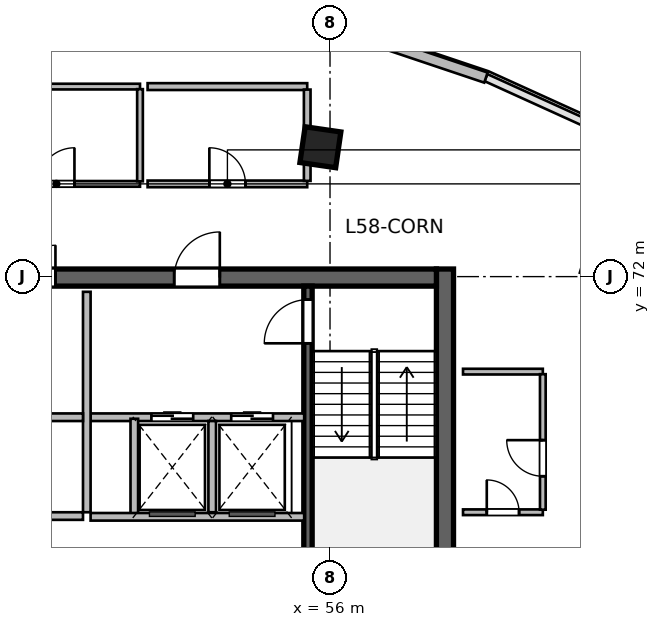
"""IFC4 building model, lengths in metres.
Left out: names, types, materials, properties, quantities, classifications, styles, units other than length and angle.
Written with IfcOpenShell. Run it as: python <this file> out.ifc"""

import sys

from ifc_helpers import new_model, si_unit, direction, frame, frame_2d, origin, origin_2d, place, context, subcontext, project, spatial, rectangle, extrude, source, transform, mapped, element, fill, save


model = new_model("IFC4")
c1 = context("Model", 3, precision=1e-05, world=origin(), true_north=direction((0.0, 1.0)))
c2 = subcontext(c1, "Body", "Model", "MODEL_VIEW")
j1 = project(units=[si_unit("LENGTHUNIT", "METRE"), si_unit("PLANEANGLEUNIT", "RADIAN")], contexts=[c1])
p1 = place(None, origin())
s1 = spatial("IfcSite", under=j1, at=p1, CompositionType="ELEMENT")
p2 = place(p1, origin())
s2 = spatial("IfcBuilding", under=s1, at=p2, CompositionType="ELEMENT")
p3 = place(p2, frame((0.0, 0.0, 239.1)))
s3 = spatial("IfcBuildingStorey", under=s2, at=p3, CompositionType="ELEMENT", Elevation=239.1)
m1 = source(origin(), c2, "Body", "SweptSolid", [
    extrude(rectangle(XDim=12.0, YDim=0.45, at=frame_2d((6.0, 0.0))), origin(), (0.0, 0.0, 1.0), 3.9),
])
p4 = place(p3, frame((59.025, 60.2, 0.0), z_axis=(0.0, 0.0, 1.0), x_axis=(0.0, 1.0, 0.0)))
e1 = element("IfcWall", 1, at=p4, inside=s3, PredefinedType="SHEAR", context=c2, shape_type="MappedRepresentation", body=[
    mapped(m1, transform((0.0, 0.0, 0.0), scale=1.0)),
])
m2 = source(origin(), c2, "Body", "SweptSolid", [
    extrude(rectangle(XDim=21.6, YDim=0.45, at=frame_2d((10.8, 0.0))), origin(), (0.0, 0.0, 1.0), 3.9),
])
p5 = place(p3, frame((37.2, 71.975, 0.0), z_axis=(0.0, 0.0, 1.0), x_axis=(1.0, 0.0, 0.0)))
e2 = element("IfcWall", 2, at=p5, inside=s3, PredefinedType="SHEAR", context=c2, shape_type="MappedRepresentation", body=[
    mapped(m2, transform((0.0, 0.0, 0.0), scale=1.0)),
])
p6 = place(p5, frame((1.2, 0.0, 0.0)))
e3 = element("IfcOpeningElement", 3, at=p6, cuts=e2, PredefinedType="OPENING", context=c2, shape_type="SweptSolid", body=[
    extrude(rectangle(XDim=0.9, YDim=2.1, at=frame_2d((0.45, 1.05))), frame((0.0, 0.235, 0.0), z_axis=(0.0, -1.0, 0.0), x_axis=(1.0, 0.0, 0.0)), (0.0, 0.0, 1.0), 0.47),
])
p7 = place(p5, frame((14.7, 0.0, 0.0)))
e4 = element("IfcOpeningElement", 4, at=p7, cuts=e2, PredefinedType="OPENING", context=c2, shape_type="SweptSolid", body=[
    extrude(rectangle(XDim=1.2, YDim=2.15, at=frame_2d((0.6, 1.075))), frame((0.0, 0.235, 0.0), z_axis=(0.0, -1.0, 0.0), x_axis=(1.0, 0.0, 0.0)), (0.0, 0.0, 1.0), 0.47),
])
p8 = place(p5, frame((4.15, 0.0, 0.0)))
e5 = element("IfcOpeningElement", 5, at=p8, cuts=e2, PredefinedType="OPENING", context=c2, shape_type="SweptSolid", body=[
    extrude(rectangle(XDim=1.3, YDim=2.15, at=frame_2d((0.65, 1.075))), frame((0.0, 0.235, 0.0), z_axis=(0.0, -1.0, 0.0), x_axis=(1.0, 0.0, 0.0)), (0.0, 0.0, 1.0), 0.47),
])
p9 = place(p5, frame((6.76, 0.0, 0.0)))
e6 = element("IfcOpeningElement", 6, at=p9, cuts=e2, PredefinedType="OPENING", context=c2, shape_type="SweptSolid", body=[
    extrude(rectangle(XDim=0.85, YDim=2.1, at=frame_2d((0.425, 1.05))), frame((0.0, 0.235, 0.0), z_axis=(0.0, -1.0, 0.0), x_axis=(1.0, 0.0, 0.0)), (0.0, 0.0, 1.0), 0.47),
])
p10 = place(p5, frame((8.76, 0.0, 0.0)))
e7 = element("IfcOpeningElement", 7, at=p10, cuts=e2, PredefinedType="OPENING", context=c2, shape_type="SweptSolid", body=[
    extrude(rectangle(XDim=0.85, YDim=2.1, at=frame_2d((0.425, 1.05))), frame((0.0, 0.235, 0.0), z_axis=(0.0, -1.0, 0.0), x_axis=(1.0, 0.0, 0.0)), (0.0, 0.0, 1.0), 0.47),
])
p11 = place(p5, frame((10.725, 0.0, 0.0)))
e8 = element("IfcOpeningElement", 8, at=p11, cuts=e2, PredefinedType="OPENING", context=c2, shape_type="SweptSolid", body=[
    extrude(rectangle(XDim=0.85, YDim=2.1, at=frame_2d((0.425, 1.05))), frame((0.0, 0.235, 0.0), z_axis=(0.0, -1.0, 0.0), x_axis=(1.0, 0.0, 0.0)), (0.0, 0.0, 1.0), 0.47),
])
m3 = source(origin(), c2, "Body", "SweptSolid", [
    extrude(rectangle(XDim=11.1, YDim=0.22, at=frame_2d((5.55, 0.0))), origin(), (0.0, 0.0, 1.0), 3.9),
])
p12 = place(p3, frame((55.42, 60.65, 0.0), z_axis=(0.0, 0.0, 1.0), x_axis=(0.0, 1.0, 0.0)))
e9 = element("IfcWall", 9, at=p12, inside=s3, PredefinedType="SHEAR", context=c2, shape_type="MappedRepresentation", body=[
    mapped(m3, transform((0.0, 0.0, 0.0), scale=1.0)),
])
p13 = place(p12, frame((9.595, 0.0, 0.0)))
e10 = element("IfcOpeningElement", 10, at=p13, cuts=e9, PredefinedType="OPENING", context=c2, shape_type="SweptSolid", body=[
    extrude(rectangle(XDim=1.15, YDim=2.15, at=frame_2d((0.575, 1.075))), frame((0.0, 0.12, 0.0), z_axis=(0.0, -1.0, 0.0), x_axis=(1.0, 0.0, 0.0)), (0.0, 0.0, 1.0), 0.24),
])
m4 = source(origin(), c2, "Body", "SweptSolid", [
    extrude(rectangle(XDim=0.95, YDim=0.95, at=origin_2d()), origin(), (0.0, 0.0, 1.0), 3.9),
])
p14 = place(p3, frame((55.747, 75.404, 0.0), z_axis=(0.0, 0.0, 1.0), x_axis=(0.143492621991, 0.98965138682, 0.0)))
e11 = element("IfcColumn", 11, at=p14, inside=s3, PredefinedType="COLUMN", context=c2, shape_type="MappedRepresentation", body=[
    mapped(m4, transform((0.0, 0.0, 0.0), scale=1.0)),
])
m5 = source(origin(), c2, "Body", "SweptSolid", [
    extrude(rectangle(XDim=3.559, YDim=0.28, at=frame_2d((1.78, 0.0))), origin(), (0.0, 0.0, 1.0), 3.65),
])
p15 = place(p3, frame((56.729, 78.37, 0.0), z_axis=(0.0, 0.0, 1.0), x_axis=(0.947933000453, -0.31846982063, 0.0)))
e12 = element("IfcWall", 12, at=p15, inside=s3, PredefinedType="SOLIDWALL", context=c2, shape_type="MappedRepresentation", body=[
    mapped(m5, transform((0.0, 0.0, 0.0), scale=1.0)),
])
m6 = source(origin(), c2, "Body", "SweptSolid", [
    extrude(rectangle(XDim=5.62, YDim=0.2, at=frame_2d((2.81, 0.0))), origin(), (0.0, 0.0, 1.0), 3.65),
])
p16 = place(p3, frame((49.7, 68.3, 0.0), z_axis=(0.0, 0.0, 1.0), x_axis=(1.0, 0.0, 0.0)))
e13 = element("IfcWall", 13, at=p16, inside=s3, PredefinedType="SOLIDWALL", context=c2, shape_type="MappedRepresentation", body=[
    mapped(m6, transform((0.0, 0.0, 0.0), scale=1.0)),
])
p17 = place(p16, frame((1.6, 0.0, 0.0)))
e14 = element("IfcOpeningElement", 14, at=p17, cuts=e13, PredefinedType="OPENING", context=c2, shape_type="SweptSolid", body=[
    extrude(rectangle(XDim=1.1, YDim=2.15, at=frame_2d((0.55, 1.075))), frame((0.0, 0.11, 0.0), z_axis=(0.0, -1.0, 0.0), x_axis=(1.0, 0.0, 0.0)), (0.0, 0.0, 1.0), 0.22),
])
p18 = place(p16, frame((3.7, 0.0, 0.0)))
e15 = element("IfcOpeningElement", 15, at=p18, cuts=e13, PredefinedType="OPENING", context=c2, shape_type="SweptSolid", body=[
    extrude(rectangle(XDim=1.1, YDim=2.15, at=frame_2d((0.55, 1.075))), frame((0.0, 0.11, 0.0), z_axis=(0.0, -1.0, 0.0), x_axis=(1.0, 0.0, 0.0)), (0.0, 0.0, 1.0), 0.22),
])
m7 = source(origin(), c2, "Body", "SweptSolid", [
    extrude(rectangle(XDim=5.8, YDim=0.2, at=frame_2d((2.9, 0.0))), origin(), (0.0, 0.0, 1.0), 3.65),
])
p19 = place(p3, frame((49.6, 65.8, 0.0), z_axis=(0.0, 0.0, 1.0), x_axis=(0.0, 1.0, 0.0)))
e16 = element("IfcWall", 16, at=p19, inside=s3, PredefinedType="SOLIDWALL", context=c2, shape_type="MappedRepresentation", body=[
    mapped(m7, transform((0.0, 0.0, 0.0), scale=1.0)),
])
m8 = source(origin(), c2, "Body", "SweptSolid", [
    extrude(rectangle(XDim=2.58, YDim=0.2, at=frame_2d((1.29, 0.0))), origin(), (0.0, 0.0, 1.0), 3.65),
])
p20 = place(p3, frame((50.85, 65.68, 0.0), z_axis=(0.0, 0.0, 1.0), x_axis=(0.0, 1.0, 0.0)))
e17 = element("IfcWall", 17, at=p20, inside=s3, PredefinedType="SOLIDWALL", context=c2, shape_type="MappedRepresentation", body=[
    mapped(m8, transform((0.0, 0.0, 0.0), scale=1.0)),
])
m9 = source(origin(), c2, "Body", "SweptSolid", [
    extrude(rectangle(XDim=2.4, YDim=0.2, at=frame_2d((1.2, 0.0))), origin(), (0.0, 0.0, 1.0), 3.65),
])
p21 = place(p3, frame((52.9, 65.8, 0.0), z_axis=(0.0, 0.0, 1.0), x_axis=(0.0, 1.0, 0.0)))
e18 = element("IfcWall", 18, at=p21, inside=s3, PredefinedType="SOLIDWALL", context=c2, shape_type="MappedRepresentation", body=[
    mapped(m9, transform((0.0, 0.0, 0.0), scale=1.0)),
])
p22 = place(p3, frame((49.7, 65.68, 0.0), z_axis=(0.0, 0.0, 1.0), x_axis=(1.0, 0.0, 0.0)))
e19 = element("IfcWall", 19, at=p22, inside=s3, PredefinedType="SOLIDWALL", context=c2, shape_type="MappedRepresentation", body=[
    mapped(m6, transform((0.0, 0.0, 0.0), scale=1.0)),
])
m10 = source(origin(), c2, "Body", "SweptSolid", [
    extrude(rectangle(XDim=8.8, YDim=0.2, at=frame_2d((4.4, 0.0))), origin(), (0.0, 0.0, 1.0), 3.65),
])
p23 = place(p3, frame((40.7, 68.3, 0.0), z_axis=(0.0, 0.0, 1.0), x_axis=(1.0, 0.0, 0.0)))
e20 = element("IfcWall", 20, at=p23, inside=s3, PredefinedType="SOLIDWALL", context=c2, shape_type="MappedRepresentation", body=[
    mapped(m10, transform((0.0, 0.0, 0.0), scale=1.0)),
])
p24 = place(p3, frame((40.7, 65.7, 0.0), z_axis=(0.0, 0.0, 1.0), x_axis=(1.0, 0.0, 0.0)))
e21 = element("IfcWall", 21, at=p24, inside=s3, PredefinedType="SOLIDWALL", context=c2, shape_type="MappedRepresentation", body=[
    mapped(m10, transform((0.0, 0.0, 0.0), scale=1.0)),
])
p25 = place(p24, frame((3.8, 0.0, 0.0)))
e22 = element("IfcOpeningElement", 22, at=p25, cuts=e21, PredefinedType="OPENING", context=c2, shape_type="SweptSolid", body=[
    extrude(rectangle(XDim=0.95, YDim=2.15, at=frame_2d((0.475, 1.075))), frame((0.0, 0.11, 0.0), z_axis=(0.0, -1.0, 0.0), x_axis=(1.0, 0.0, 0.0)), (0.0, 0.0, 1.0), 0.22),
])
m11 = source(origin(), c2, "Body", "SweptSolid", [
    extrude(rectangle(XDim=2.1, YDim=0.15, at=frame_2d((1.05, 0.0))), origin(), (0.0, 0.0, 1.0), 3.65),
])
p26 = place(p3, frame((59.5, 65.8, 0.0), z_axis=(0.0, 0.0, 1.0), x_axis=(1.0, 0.0, 0.0)))
e23 = element("IfcWall", 23, at=p26, inside=s3, PredefinedType="PARTITIONING", context=c2, shape_type="MappedRepresentation", body=[
    mapped(m11, transform((0.0, 0.0, 0.0), scale=1.0)),
])
p27 = place(p26, frame((0.625, 0.0, 0.0)))
e24 = element("IfcOpeningElement", 24, at=p27, cuts=e23, PredefinedType="OPENING", context=c2, shape_type="SweptSolid", body=[
    extrude(rectangle(XDim=0.85, YDim=2.1, at=frame_2d((0.425, 1.05))), frame((0.0, 0.085, 0.0), z_axis=(0.0, -1.0, 0.0), x_axis=(1.0, 0.0, 0.0)), (0.0, 0.0, 1.0), 0.17),
])
p28 = place(p3, frame((59.5, 69.5, 0.0), z_axis=(0.0, 0.0, 1.0), x_axis=(1.0, 0.0, 0.0)))
e25 = element("IfcWall", 25, at=p28, inside=s3, PredefinedType="PARTITIONING", context=c2, shape_type="MappedRepresentation", body=[
    mapped(m11, transform((0.0, 0.0, 0.0), scale=1.0)),
])
m12 = source(origin(), c2, "Body", "SweptSolid", [
    extrude(rectangle(XDim=3.565, YDim=0.15, at=frame_2d((1.783, 0.0))), origin(), (0.0, 0.0, 1.0), 3.65),
])
p29 = place(p3, frame((61.6, 65.867, 0.0), z_axis=(0.0, 0.0, 1.0), x_axis=(0.0, 1.0, 0.0)))
e26 = element("IfcWall", 26, at=p29, inside=s3, PredefinedType="PARTITIONING", context=c2, shape_type="MappedRepresentation", body=[
    mapped(m12, transform((0.0, 0.0, 0.0), scale=1.0)),
])
p30 = place(p29, frame((0.88, 0.0, 0.0)))
e27 = element("IfcOpeningElement", 27, at=p30, cuts=e26, PredefinedType="OPENING", context=c2, shape_type="SweptSolid", body=[
    extrude(rectangle(XDim=0.95, YDim=2.1, at=frame_2d((0.475, 1.05))), frame((0.0, 0.085, 0.0), z_axis=(0.0, -1.0, 0.0), x_axis=(1.0, 0.0, 0.0)), (0.0, 0.0, 1.0), 0.17),
])
m13 = source(origin(), c2, "Body", "SweptSolid", [
    extrude(rectangle(XDim=4.4, YDim=0.15, at=frame_2d((2.2, 0.0))), origin(), (0.0, 0.0, 1.0), 3.65),
])
p31 = place(p3, frame((46.6, 74.44, 0.0), z_axis=(0.0, 0.0, 1.0), x_axis=(1.0, 0.0, 0.0)))
e28 = element("IfcWall", 28, at=p31, inside=s3, PredefinedType="PARTITIONING", context=c2, shape_type="MappedRepresentation", body=[
    mapped(m13, transform((0.0, 0.0, 0.0), scale=1.0)),
])
p32 = place(p31, frame((1.725, 0.0, 0.0)))
e29 = element("IfcOpeningElement", 29, at=p32, cuts=e28, PredefinedType="OPENING", context=c2, shape_type="SweptSolid", body=[
    extrude(rectangle(XDim=0.95, YDim=2.1, at=frame_2d((0.475, 1.05))), frame((0.0, 0.085, 0.0), z_axis=(0.0, -1.0, 0.0), x_axis=(1.0, 0.0, 0.0)), (0.0, 0.0, 1.0), 0.17),
])
p33 = place(p3, frame((46.6, 77.0, 0.0), z_axis=(0.0, 0.0, 1.0), x_axis=(1.0, 0.0, 0.0)))
e30 = element("IfcWall", 30, at=p33, inside=s3, PredefinedType="PARTITIONING", context=c2, shape_type="MappedRepresentation", body=[
    mapped(m13, transform((0.0, 0.0, 0.0), scale=1.0)),
])
m14 = source(origin(), c2, "Body", "SweptSolid", [
    extrude(rectangle(XDim=2.425, YDim=0.15, at=frame_2d((1.212, 0.0))), origin(), (0.0, 0.0, 1.0), 3.65),
])
p34 = place(p3, frame((51.0, 74.508, 0.0), z_axis=(0.0, 0.0, 1.0), x_axis=(0.0, 1.0, 0.0)))
e31 = element("IfcWall", 31, at=p34, inside=s3, PredefinedType="PARTITIONING", context=c2, shape_type="MappedRepresentation", body=[
    mapped(m14, transform((0.0, 0.0, 0.0), scale=1.0)),
])
m15 = source(origin(), c2, "Body", "SweptSolid", [
    extrude(rectangle(XDim=4.2, YDim=0.175, at=frame_2d((2.1, 0.0))), origin(), (0.0, 0.0, 1.0), 3.65),
])
p35 = place(p3, frame((51.2, 74.44, 0.0), z_axis=(0.0, 0.0, 1.0), x_axis=(1.0, 0.0, 0.0)))
e32 = element("IfcWall", 32, at=p35, inside=s3, PredefinedType="PARTITIONING", context=c2, shape_type="MappedRepresentation", body=[
    mapped(m15, transform((0.0, 0.0, 0.0), scale=1.0)),
])
p36 = place(p35, frame((1.625, 0.0, 0.0)))
e33 = element("IfcOpeningElement", 33, at=p36, cuts=e32, PredefinedType="OPENING", context=c2, shape_type="SweptSolid", body=[
    extrude(rectangle(XDim=0.95, YDim=2.12, at=frame_2d((0.475, 1.06))), frame((0.0, 0.098, 0.0), z_axis=(0.0, -1.0, 0.0), x_axis=(1.0, 0.0, 0.0)), (0.0, 0.0, 1.0), 0.195),
])
m16 = source(origin(), c2, "Body", "SweptSolid", [
    extrude(rectangle(XDim=4.2, YDim=0.18, at=frame_2d((2.1, 0.0))), origin(), (0.0, 0.0, 1.0), 3.65),
])
p37 = place(p3, frame((51.2, 77.0, 0.0), z_axis=(0.0, 0.0, 1.0), x_axis=(1.0, 0.0, 0.0)))
e34 = element("IfcWall", 34, at=p37, inside=s3, PredefinedType="PLUMBINGWALL", context=c2, shape_type="MappedRepresentation", body=[
    mapped(m16, transform((0.0, 0.0, 0.0), scale=1.0)),
])
m17 = source(origin(), c2, "Body", "SweptSolid", [
    extrude(rectangle(XDim=2.403, YDim=0.175, at=frame_2d((1.201, 0.0))), origin(), (0.0, 0.0, 1.0), 3.65),
])
p38 = place(p3, frame((55.4, 74.519, 0.0), z_axis=(0.0, 0.0, 1.0), x_axis=(0.0, 1.0, 0.0)))
e35 = element("IfcWall", 35, at=p38, inside=s3, PredefinedType="PARTITIONING", context=c2, shape_type="MappedRepresentation", body=[
    mapped(m17, transform((0.0, 0.0, 0.0), scale=1.0)),
])
m18 = source(origin(), c2, "Body", "SweptSolid", [
    extrude(rectangle(XDim=1.15, YDim=2.15, at=frame_2d((0.575, 1.075))), frame((0.0, 0.025, 0.0), z_axis=(0.0, -1.0, 0.0), x_axis=(1.0, 0.0, 0.0)), (0.0, 0.0, 1.0), 0.05),
])
p39 = place(p13, origin())
e36 = element("IfcDoor", 36, at=p39, inside=s3, OperationType="SINGLE_SWING_LEFT", PredefinedType="DOOR", context=c2, shape_type="MappedRepresentation", body=[
    mapped(m18, transform((0.0, 0.0, 0.0), scale=1.0)),
])
fill(e10, e36)
m19 = source(origin(), c2, "Body", "SweptSolid", [
    extrude(rectangle(XDim=1.2, YDim=2.15, at=frame_2d((0.6, 1.075))), frame((0.0, 0.025, 0.0), z_axis=(0.0, -1.0, 0.0), x_axis=(1.0, 0.0, 0.0)), (0.0, 0.0, 1.0), 0.05),
])
p40 = place(p7, origin())
e37 = element("IfcDoor", 37, at=p40, inside=s3, OperationType="SINGLE_SWING_RIGHT", PredefinedType="DOOR", context=c2, shape_type="MappedRepresentation", body=[
    mapped(m19, transform((0.0, 0.0, 0.0), scale=1.0)),
])
fill(e4, e37)
m20 = source(origin(), c2, "Body", "SweptSolid", [
    extrude(rectangle(XDim=1.1, YDim=2.15, at=frame_2d((0.55, 1.075))), frame((0.0, 0.025, 0.0), z_axis=(0.0, -1.0, 0.0), x_axis=(1.0, 0.0, 0.0)), (0.0, 0.0, 1.0), 0.05),
])
p41 = place(p17, origin())
e38 = element("IfcDoor", 38, at=p41, inside=s3, OperationType="DOUBLE_DOOR_SLIDING", PredefinedType="DOOR", context=c2, shape_type="MappedRepresentation", body=[
    mapped(m20, transform((0.0, 0.0, 0.0), scale=1.0)),
])
fill(e14, e38)
p42 = place(p18, origin())
e39 = element("IfcDoor", 39, at=p42, inside=s3, OperationType="DOUBLE_DOOR_SLIDING", PredefinedType="DOOR", context=c2, shape_type="MappedRepresentation", body=[
    mapped(m20, transform((0.0, 0.0, 0.0), scale=1.0)),
])
fill(e15, e39)
m21 = source(origin(), c2, "Body", "SweptSolid", [
    extrude(rectangle(XDim=0.85, YDim=2.1, at=frame_2d((0.425, 1.05))), frame((0.0, 0.025, 0.0), z_axis=(0.0, -1.0, 0.0), x_axis=(1.0, 0.0, 0.0)), (0.0, 0.0, 1.0), 0.05),
])
p43 = place(p11, origin())
e40 = element("IfcDoor", 40, at=p43, inside=s3, OperationType="SINGLE_SWING_RIGHT", PredefinedType="DOOR", context=c2, shape_type="MappedRepresentation", body=[
    mapped(m21, transform((0.0, 0.0, 0.0), scale=1.0)),
])
fill(e8, e40)
p44 = place(p27, origin())
e41 = element("IfcDoor", 41, at=p44, inside=s3, OperationType="SINGLE_SWING_LEFT", PredefinedType="DOOR", context=c2, shape_type="MappedRepresentation", body=[
    mapped(m21, transform((0.0, 0.0, 0.0), scale=1.0)),
])
fill(e24, e41)
m22 = source(origin(), c2, "Body", "SweptSolid", [
    extrude(rectangle(XDim=0.95, YDim=2.1, at=frame_2d((0.475, 1.05))), frame((0.0, 0.025, 0.0), z_axis=(0.0, -1.0, 0.0), x_axis=(1.0, 0.0, 0.0)), (0.0, 0.0, 1.0), 0.05),
])
p45 = place(p32, origin())
e42 = element("IfcDoor", 42, at=p45, inside=s3, OperationType="SINGLE_SWING_RIGHT", PredefinedType="DOOR", context=c2, shape_type="MappedRepresentation", body=[
    mapped(m22, transform((0.0, 0.0, 0.0), scale=1.0)),
])
fill(e29, e42)
m23 = source(origin(), c2, "Body", "SweptSolid", [
    extrude(rectangle(XDim=0.95, YDim=2.12, at=frame_2d((0.475, 1.06))), frame((0.0, 0.025, 0.0), z_axis=(0.0, -1.0, 0.0), x_axis=(1.0, 0.0, 0.0)), (0.0, 0.0, 1.0), 0.05),
])
p46 = place(p36, origin())
e43 = element("IfcDoor", 43, at=p46, inside=s3, OperationType="SINGLE_SWING_LEFT", PredefinedType="DOOR", context=c2, shape_type="MappedRepresentation", body=[
    mapped(m23, transform((0.0, 0.0, 0.0), scale=1.0)),
])
fill(e33, e43)
p47 = place(p30, origin())
e44 = element("IfcDoor", 44, at=p47, inside=s3, OperationType="SINGLE_SWING_RIGHT", PredefinedType="DOOR", context=c2, shape_type="MappedRepresentation", body=[
    mapped(m22, transform((0.0, 0.0, 0.0), scale=1.0)),
])
fill(e27, e44)
save(model, sys.argv[1])
